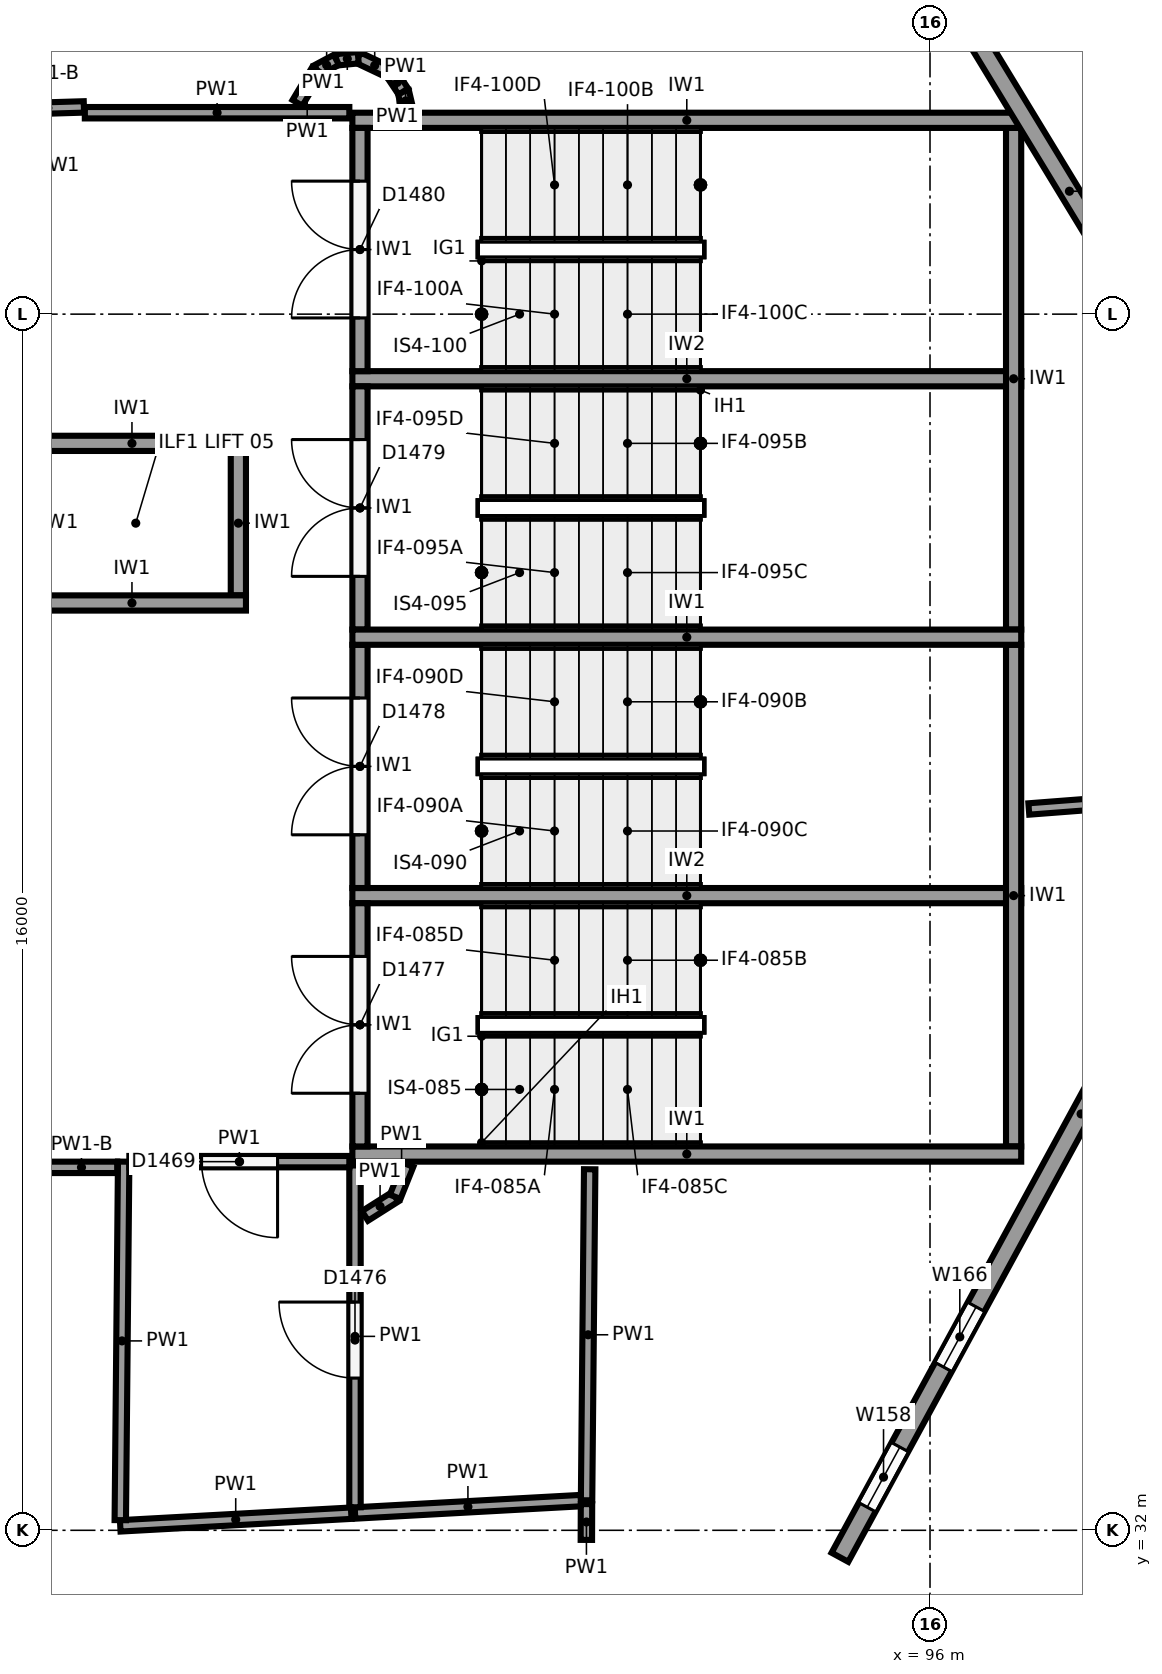
"""IFC4 building model, lengths in metres.
Left out: names, types, materials, properties, quantities, classifications, styles, units other than length and angle.
Written with IfcOpenShell. Run it as: python <this file> out.ifc"""

import sys

from ifc_helpers import new_model, si_unit, direction, frame, frame_2d, origin, origin_2d, place, context, subcontext, project, spatial, rectangle, circle, extrude, element, fill, save


model = new_model("IFC4")
c1 = context("Model", 3, precision=1e-05, world=origin(), true_north=direction((0.0, 1.0)))
c2 = subcontext(c1, "Body", "Model", "MODEL_VIEW")
j1 = project(units=[si_unit("LENGTHUNIT", "METRE"), si_unit("PLANEANGLEUNIT", "RADIAN")], contexts=[c1])
p1 = place(None, origin())
s1 = spatial("IfcSite", under=j1, at=p1, CompositionType="ELEMENT")
p2 = place(p1, origin())
s2 = spatial("IfcBuilding", under=s1, at=p2, CompositionType="ELEMENT")
p3 = place(p2, frame((0.0, 0.0, 18.0)))
s3 = spatial("IfcBuildingStorey", under=s2, at=p3, CompositionType="ELEMENT", Elevation=18.0)
p4 = place(p3, frame((84.925, 30.682, 0.0), z_axis=(0.0, 0.0, 1.0), x_axis=(1.0, 0.0, 0.0)))
e1 = element("IfcColumn", 1, at=p4, inside=s3, PredefinedType="COLUMN", context=c2, shape_type="SweptSolid", body=[
    extrude(circle(Radius=0.5, at=origin_2d()), origin(), (0.0, 0.0, 1.0), 6.0),
])
p5 = place(p3, frame((94.6, 31.25, 0.0), z_axis=(0.0, 0.0, 1.0), x_axis=(1.0, 0.0, 0.0)))
e2 = element("IfcColumn", 2, at=p5, inside=s3, PredefinedType="COLUMN", context=c2, shape_type="SweptSolid", body=[
    extrude(circle(Radius=0.45, at=origin_2d()), origin(), (0.0, 0.0, 1.0), 6.0),
])
p6 = place(p3, frame((84.884, 42.562, 0.0), z_axis=(0.0, 0.0, 1.0), x_axis=(1.0, 0.0, 0.0)))
e3 = element("IfcColumn", 3, at=p6, inside=s3, PredefinedType="COLUMN", context=c2, shape_type="SweptSolid", body=[
    extrude(circle(Radius=0.6, at=origin_2d()), origin(), (0.0, 0.0, 1.0), 6.0),
])
p7 = place(p3, frame((101.161, 43.311, 0.0), z_axis=(0.0, 0.0, 1.0), x_axis=(-0.477867771117, -0.878431780691, 0.0)))
e4 = element("IfcWall", 4, at=p7, inside=s3, PredefinedType="SOLIDWALL", context=c2, shape_type="SweptSolid", body=[
    extrude(rectangle(XDim=13.28, YDim=0.25, at=frame_2d((6.64, 0.0))), origin(), (0.0, 0.0, 1.0), 4.3),
])
p8 = place(p7, frame((11.63, 0.0, 1.0)))
e5 = element("IfcOpeningElement", 5, at=p8, cuts=e4, PredefinedType="OPENING", context=c2, shape_type="SweptSolid", body=[
    extrude(rectangle(XDim=0.9, YDim=3.25, at=frame_2d((0.45, 1.625))), frame((0.0, 0.135, 0.0), z_axis=(0.0, -1.0, 0.0), x_axis=(1.0, 0.0, 0.0)), (0.0, 0.0, 1.0), 0.27),
])
p9 = place(p7, frame((9.53, 0.0, 1.0)))
e6 = element("IfcOpeningElement", 6, at=p9, cuts=e4, PredefinedType="OPENING", context=c2, shape_type="SweptSolid", body=[
    extrude(rectangle(XDim=0.9, YDim=3.25, at=frame_2d((0.45, 1.625))), frame((0.0, 0.135, 0.0), z_axis=(0.0, -1.0, 0.0), x_axis=(1.0, 0.0, 0.0)), (0.0, 0.0, 1.0), 0.27),
])
p10 = place(p7, frame((1.13, 0.0, 1.0)))
e7 = element("IfcOpeningElement", 7, at=p10, cuts=e4, PredefinedType="OPENING", context=c2, shape_type="SweptSolid", body=[
    extrude(rectangle(XDim=0.9, YDim=3.25, at=frame_2d((0.45, 1.625))), frame((0.0, 0.135, 0.0), z_axis=(0.0, -1.0, 0.0), x_axis=(1.0, 0.0, 0.0)), (0.0, 0.0, 1.0), 0.27),
])
p11 = place(p3, frame((94.528, 55.057, 0.0), z_axis=(0.0, 0.0, 1.0), x_axis=(0.519362860044, -0.854553813172, 0.0)))
e8 = element("IfcWall", 8, at=p11, inside=s3, PredefinedType="SOLIDWALL", context=c2, shape_type="SweptSolid", body=[
    extrude(rectangle(XDim=12.732, YDim=0.25, at=frame_2d((6.366, 0.0))), origin(), (0.0, 0.0, 1.0), 4.3),
])
p12 = place(p11, frame((0.75, 0.0, 1.0)))
e9 = element("IfcOpeningElement", 9, at=p12, cuts=e8, PredefinedType="OPENING", context=c2, shape_type="SweptSolid", body=[
    extrude(rectangle(XDim=0.9, YDim=3.25, at=frame_2d((0.45, 1.625))), frame((0.0, 0.135, 0.0), z_axis=(0.0, -1.0, 0.0), x_axis=(1.0, 0.0, 0.0)), (0.0, 0.0, 1.0), 0.27),
])
p13 = place(p11, frame((2.851, 0.0, 1.0)))
e10 = element("IfcOpeningElement", 10, at=p13, cuts=e8, PredefinedType="OPENING", context=c2, shape_type="SweptSolid", body=[
    extrude(rectangle(XDim=0.9, YDim=3.25, at=frame_2d((0.45, 1.625))), frame((0.0, 0.135, 0.0), z_axis=(0.0, -1.0, 0.0), x_axis=(1.0, 0.0, 0.0)), (0.0, 0.0, 1.0), 0.27),
])
p14 = place(p11, frame((11.25, 0.0, 1.0)))
e11 = element("IfcOpeningElement", 11, at=p14, cuts=e8, PredefinedType="OPENING", context=c2, shape_type="SweptSolid", body=[
    extrude(rectangle(XDim=0.9, YDim=3.25, at=frame_2d((0.45, 1.625))), frame((0.0, 0.135, 0.0), z_axis=(0.0, -1.0, 0.0), x_axis=(1.0, 0.0, 0.0)), (0.0, 0.0, 1.0), 0.27),
])
for number, where, z_axis, x_axis in (
    (12, (97.2, 36.95, 0.0), (0.0, 0.0, 1.0), (-1.0, 0.0, 0.0)),
    (13, (97.2, 43.75, 0.0), (0.0, 0.0, 1.0), (-1.0, 0.0, 0.0)),
    (14, (97.2, 50.55, 0.0), (0.0, 0.0, 1.0), (-1.0, 0.0, 0.0)),
):
    element("IfcWall", number, at=place(p3, frame(where, z_axis=z_axis, x_axis=x_axis)), inside=s3, PredefinedType="SHEAR", context=c2, shape_type="SweptSolid", body=[
        extrude(rectangle(XDim=8.8, YDim=0.2, at=frame_2d((4.4, 0.0))), origin(), (0.0, 0.0, 1.0), 5.6),
    ])
for number, where, z_axis, x_axis in (
    (15, (97.1, 37.05, 0.0), (0.0, 0.0, 1.0), (0.0, 1.0, 0.0)),
    (16, (97.1, 43.85, 0.0), (0.0, 0.0, 1.0), (0.0, 1.0, 0.0)),
):
    element("IfcWall", number, at=place(p3, frame(where, z_axis=z_axis, x_axis=x_axis)), inside=s3, PredefinedType="SHEAR", context=c2, shape_type="SweptSolid", body=[
        extrude(rectangle(XDim=6.6, YDim=0.2, at=frame_2d((3.3, 0.0))), origin(), (0.0, 0.0, 1.0), 5.6),
    ])
for number, where, z_axis, x_axis in (
    (17, (97.2, 40.35, 0.0), (0.0, 0.0, 1.0), (-1.0, 0.0, 0.0)),
    (18, (97.2, 47.15, 0.0), (0.0, 0.0, 1.0), (-1.0, 0.0, 0.0)),
):
    element("IfcWall", number, at=place(p3, frame(where, z_axis=z_axis, x_axis=x_axis)), inside=s3, PredefinedType="SHEAR", context=c2, shape_type="SweptSolid", body=[
        extrude(rectangle(XDim=8.8, YDim=0.2, at=frame_2d((4.4, 0.0))), origin(), (0.0, 0.0, 1.0), 5.6),
    ])
p15 = place(p3, frame((88.5, 37.05, 0.0), z_axis=(0.0, 0.0, 1.0), x_axis=(0.0, 1.0, 0.0)))
e19 = element("IfcWall", 19, at=p15, inside=s3, PredefinedType="SHEAR", context=c2, shape_type="SweptSolid", body=[
    extrude(rectangle(XDim=3.2, YDim=0.2, at=frame_2d((1.6, 0.0))), origin(), (0.0, 0.0, 1.0), 5.6),
])
p16 = place(p15, frame((0.7, 0.0, 0.0)))
e20 = element("IfcOpeningElement", 20, at=p16, cuts=e19, PredefinedType="OPENING", context=c2, shape_type="SweptSolid", body=[
    extrude(rectangle(XDim=1.8, YDim=2.1, at=frame_2d((0.9, 1.05))), frame((0.0, 0.11, 0.0), z_axis=(0.0, -1.0, 0.0), x_axis=(1.0, 0.0, 0.0)), (0.0, 0.0, 1.0), 0.22),
])
p17 = place(p3, frame((88.5, 40.45, 0.0), z_axis=(0.0, 0.0, 1.0), x_axis=(0.0, 1.0, 0.0)))
e21 = element("IfcWall", 21, at=p17, inside=s3, PredefinedType="SHEAR", context=c2, shape_type="SweptSolid", body=[
    extrude(rectangle(XDim=3.2, YDim=0.2, at=frame_2d((1.6, 0.0))), origin(), (0.0, 0.0, 1.0), 5.6),
])
p18 = place(p17, frame((0.7, 0.0, 0.0)))
e22 = element("IfcOpeningElement", 22, at=p18, cuts=e21, PredefinedType="OPENING", context=c2, shape_type="SweptSolid", body=[
    extrude(rectangle(XDim=1.8, YDim=2.1, at=frame_2d((0.9, 1.05))), frame((0.0, 0.11, 0.0), z_axis=(0.0, -1.0, 0.0), x_axis=(1.0, 0.0, 0.0)), (0.0, 0.0, 1.0), 0.22),
])
p19 = place(p3, frame((88.5, 43.85, 0.0), z_axis=(0.0, 0.0, 1.0), x_axis=(0.0, 1.0, 0.0)))
e23 = element("IfcWall", 23, at=p19, inside=s3, PredefinedType="SHEAR", context=c2, shape_type="SweptSolid", body=[
    extrude(rectangle(XDim=3.2, YDim=0.2, at=frame_2d((1.6, 0.0))), origin(), (0.0, 0.0, 1.0), 5.6),
])
p20 = place(p19, frame((0.7, 0.0, 0.0)))
e24 = element("IfcOpeningElement", 24, at=p20, cuts=e23, PredefinedType="OPENING", context=c2, shape_type="SweptSolid", body=[
    extrude(rectangle(XDim=1.8, YDim=2.1, at=frame_2d((0.9, 1.05))), frame((0.0, 0.11, 0.0), z_axis=(0.0, -1.0, 0.0), x_axis=(1.0, 0.0, 0.0)), (0.0, 0.0, 1.0), 0.22),
])
p21 = place(p3, frame((88.5, 47.25, 0.0), z_axis=(0.0, 0.0, 1.0), x_axis=(0.0, 1.0, 0.0)))
e25 = element("IfcWall", 25, at=p21, inside=s3, PredefinedType="SHEAR", context=c2, shape_type="SweptSolid", body=[
    extrude(rectangle(XDim=3.2, YDim=0.2, at=frame_2d((1.6, 0.0))), origin(), (0.0, 0.0, 1.0), 5.6),
])
p22 = place(p21, frame((0.7, 0.0, 0.0)))
e26 = element("IfcOpeningElement", 26, at=p22, cuts=e25, PredefinedType="OPENING", context=c2, shape_type="SweptSolid", body=[
    extrude(rectangle(XDim=1.8, YDim=2.1, at=frame_2d((0.9, 1.05))), frame((0.0, 0.11, 0.0), z_axis=(0.0, -1.0, 0.0), x_axis=(1.0, 0.0, 0.0)), (0.0, 0.0, 1.0), 0.22),
])
for number, where, z_axis, x_axis in (
    (27, (87.0, 44.2, 0.0), (0.0, 0.0, 1.0), (-1.0, 0.0, 0.0)),
    (28, (87.0, 46.3, 0.0), (0.0, 0.0, 1.0), (-1.0, 0.0, 0.0)),
):
    element("IfcWall", number, at=place(p3, frame(where, z_axis=z_axis, x_axis=x_axis)), inside=s3, PredefinedType="SHEAR", context=c2, shape_type="SweptSolid", body=[
        extrude(rectangle(XDim=3.0, YDim=0.2, at=frame_2d((1.5, 0.0))), origin(), (0.0, 0.0, 1.0), 5.6),
    ])
p23 = place(p3, frame((86.9, 44.3, 0.0), z_axis=(0.0, 0.0, 1.0), x_axis=(0.0, 1.0, 0.0)))
e29 = element("IfcWall", 29, at=p23, inside=s3, PredefinedType="SHEAR", context=c2, shape_type="SweptSolid", body=[
    extrude(rectangle(XDim=1.9, YDim=0.2, at=frame_2d((0.95, 0.0))), origin(), (0.0, 0.0, 1.0), 5.6),
])
p24 = place(p3, frame((91.522, 36.75, 0.0), z_axis=(0.0, 0.0, 1.0), x_axis=(-0.009417678532, -0.999955652682, 0.0)))
e30 = element("IfcWall", 30, at=p24, inside=s3, PredefinedType="PARTITIONING", context=c2, shape_type="SweptSolid", body=[
    extrude(rectangle(XDim=4.355, YDim=0.15, at=frame_2d((2.178, 0.0))), origin(), (0.0, 0.0, 1.0), 5.6),
])
p25 = place(p3, frame((91.406, 32.391, 0.0), z_axis=(0.0, 0.0, 1.0), x_axis=(-0.998501968138, -0.054715807817, 0.0)))
e31 = element("IfcWall", 31, at=p25, inside=s3, PredefinedType="PARTITIONING", context=c2, shape_type="SweptSolid", body=[
    extrude(rectangle(XDim=2.976, YDim=0.15, at=frame_2d((1.488, 0.0))), origin(), (0.0, 0.0, 1.0), 5.6),
])
p26 = place(p3, frame((88.435, 32.303, 0.0), z_axis=(0.0, 0.0, 1.0), x_axis=(0.0, 1.0, 0.0)))
e32 = element("IfcWall", 32, at=p26, inside=s3, PredefinedType="PARTITIONING", context=c2, shape_type="SweptSolid", body=[
    extrude(rectangle(XDim=4.497, YDim=0.15, at=frame_2d((2.249, 0.0))), origin(), (0.0, 0.0, 1.0), 5.6),
])
p27 = place(p26, frame((1.7, 0.0, 0.0)))
e33 = element("IfcOpeningElement", 33, at=p27, cuts=e32, PredefinedType="OPENING", context=c2, shape_type="SweptSolid", body=[
    extrude(rectangle(XDim=1.0, YDim=2.1, at=frame_2d((0.5, 1.05))), frame((0.0, 0.085, 0.0), z_axis=(0.0, -1.0, 0.0), x_axis=(1.0, 0.0, 0.0)), (0.0, 0.0, 1.0), 0.17),
])
p28 = place(p3, frame((88.385, 32.225, 0.0), z_axis=(0.0, 0.0, 1.0), x_axis=(-0.99850227238, -0.054710255464, 0.0)))
e34 = element("IfcWall", 34, at=p28, inside=s3, PredefinedType="PARTITIONING", context=c2, shape_type="SweptSolid", body=[
    extrude(rectangle(XDim=3.043, YDim=0.15, at=frame_2d((1.522, 0.0))), origin(), (0.0, 0.0, 1.0), 5.6),
])
p29 = place(p3, frame((85.346, 32.134, 0.0), z_axis=(0.0, 0.0, 1.0), x_axis=(0.009420359449, 0.999955627429, 0.0)))
e35 = element("IfcWall", 35, at=p29, inside=s3, PredefinedType="PARTITIONING", context=c2, shape_type="SweptSolid", body=[
    extrude(rectangle(XDim=4.717, YDim=0.15, at=frame_2d((2.358, 0.0))), origin(), (0.0, 0.0, 1.0), 5.6),
])
p30 = place(p3, frame((85.466, 36.85, 0.0), z_axis=(0.0, 0.0, 1.0), x_axis=(1.0, 0.0, 0.0)))
e36 = element("IfcWall", 36, at=p30, inside=s3, PredefinedType="PARTITIONING", context=c2, shape_type="SweptSolid", body=[
    extrude(rectangle(XDim=2.894, YDim=0.15, at=frame_2d((1.447, 0.0))), origin(), (0.0, 0.0, 1.0), 5.6),
])
p31 = place(p30, frame((0.95, 0.0, 0.0)))
e37 = element("IfcOpeningElement", 37, at=p31, cuts=e36, PredefinedType="OPENING", context=c2, shape_type="SweptSolid", body=[
    extrude(rectangle(XDim=1.0, YDim=2.1, at=frame_2d((0.5, 1.05))), frame((0.0, 0.085, 0.0), z_axis=(0.0, -1.0, 0.0), x_axis=(1.0, 0.0, 0.0)), (0.0, 0.0, 1.0), 0.17),
])
p32 = place(p3, frame((91.48, 32.345, 0.0), z_axis=(0.0, 0.0, 1.0), x_axis=(-0.004147190878, -0.999991400367, 0.0)))
e38 = element("IfcWall", 38, at=p32, inside=s3, PredefinedType="PARTITIONING", context=c2, shape_type="SweptSolid", body=[
    extrude(rectangle(XDim=0.471, YDim=0.15, at=frame_2d((0.235, 0.0))), origin(), (0.0, 0.0, 1.0), 5.6),
])
p33 = place(p3, frame((97.3, 41.49, 0.0), z_axis=(0.0, 0.0, 1.0), x_axis=(0.99706720675, 0.076530942913, 0.0)))
e39 = element("IfcWall", 39, at=p33, inside=s3, PredefinedType="PARTITIONING", context=c2, shape_type="SweptSolid", body=[
    extrude(rectangle(XDim=2.255, YDim=0.15, at=frame_2d((1.128, 0.0))), origin(), (0.0, 0.0, 1.0), 5.6),
])
p34 = place(p3, frame((88.36, 50.65, 0.0), z_axis=(0.0, 0.0, 1.0), x_axis=(-1.0, 0.0, 0.0)))
e40 = element("IfcWall", 40, at=p34, inside=s3, PredefinedType="PARTITIONING", context=c2, shape_type="SweptSolid", body=[
    extrude(rectangle(XDim=3.48, YDim=0.15, at=frame_2d((1.74, 0.0))), origin(), (0.0, 0.0, 1.0), 5.6),
])
p35 = place(p3, frame((84.366, 36.775, 0.0), z_axis=(0.0, 0.0, 1.0), x_axis=(1.0, 0.0, 0.0)))
e41 = element("IfcWall", 41, at=p35, inside=s3, PredefinedType="PARTITIONING", context=c2, shape_type="SweptSolid", body=[
    extrude(rectangle(XDim=0.94, YDim=0.15, at=frame_2d((0.47, 0.0))), origin(), (0.0, 0.0, 1.0), 4.5),
])
p36 = place(p3, frame((88.566, 36.136, 0.0), z_axis=(0.0, 0.0, 1.0), x_axis=(0.845155463404, 0.534520572737, 0.0)))
e42 = element("IfcWall", 42, at=p36, inside=s3, PredefinedType="PARTITIONING", context=c2, shape_type="SweptSolid", body=[
    extrude(rectangle(XDim=0.47, YDim=0.15, at=frame_2d((0.235, 0.0))), origin(), (0.0, 0.0, 1.0), 5.6),
])
p37 = place(p3, frame((88.963, 36.387, 0.0), z_axis=(0.0, 0.0, 1.0), x_axis=(0.371761148228, 0.928328416385, 0.0)))
e43 = element("IfcWall", 43, at=p37, inside=s3, PredefinedType="PARTITIONING", context=c2, shape_type="SweptSolid", body=[
    extrude(rectangle(XDim=0.454, YDim=0.15, at=frame_2d((0.227, 0.0))), origin(), (0.0, 0.0, 1.0), 5.6),
])
p38 = place(p3, frame((89.13, 50.678, 0.0), z_axis=(0.0, 0.0, 1.0), x_axis=(-0.231150896285, 0.972917911823, 0.0)))
e44 = element("IfcWall", 44, at=p38, inside=s3, PredefinedType="PARTITIONING", context=c2, shape_type="SweptSolid", body=[
    extrude(rectangle(XDim=0.258, YDim=0.15, at=frame_2d((0.129, 0.0))), origin(), (0.0, 0.0, 1.0), 5.6),
])
p39 = place(p3, frame((89.07, 50.929, 0.0), z_axis=(0.0, 0.0, 1.0), x_axis=(-0.555678694372, 0.831397130511, 0.0)))
e45 = element("IfcWall", 45, at=p39, inside=s3, PredefinedType="PARTITIONING", context=c2, shape_type="SweptSolid", body=[
    extrude(rectangle(XDim=0.288, YDim=0.15, at=frame_2d((0.144, 0.0))), origin(), (0.0, 0.0, 1.0), 5.6),
])
p40 = place(p3, frame((88.91, 51.168, 0.0), z_axis=(0.0, 0.0, 1.0), x_axis=(-0.903893315025, 0.427757963167, 0.0)))
e46 = element("IfcWall", 46, at=p40, inside=s3, PredefinedType="PARTITIONING", context=c2, shape_type="SweptSolid", body=[
    extrude(rectangle(XDim=0.479, YDim=0.15, at=frame_2d((0.24, 0.0))), origin(), (0.0, 0.0, 1.0), 5.6),
])
for number, where, z_axis, x_axis in (
    (47, (88.477, 51.374, 0.0), (0.0, 0.0, 1.0), (-0.995, -0.098, 0.0)),
    (48, (88.189, 51.345, 0.0), (0.0, 0.0, 1.0), (-0.882, -0.472, 0.0)),
):
    element("IfcWall", number, at=place(p3, frame(where, z_axis=z_axis, x_axis=x_axis)), inside=s3, PredefinedType="PARTITIONING", context=c2, shape_type="SweptSolid", body=[
        extrude(rectangle(XDim=0.289, YDim=0.15, at=frame_2d((0.145, 0.0))), origin(), (0.0, 0.0, 1.0), 5.6),
    ])
p41 = place(p3, frame((87.934, 51.209, 0.0), z_axis=(0.0, 0.0, 1.0), x_axis=(-0.513060623194, -0.858352373404, 0.0)))
e49 = element("IfcWall", 49, at=p41, inside=s3, PredefinedType="PARTITIONING", context=c2, shape_type="SweptSolid", body=[
    extrude(rectangle(XDim=0.5, YDim=0.15, at=frame_2d((0.25, 0.0))), origin(), (0.0, 0.0, 1.0), 5.6),
])
p42 = place(p3, frame((84.868, 50.726, 0.0), z_axis=(0.0, 0.0, 1.0), x_axis=(-0.999545658695, -0.030140938677, 0.0)))
e50 = element("IfcWall", 50, at=p42, inside=s3, PredefinedType="PARTITIONING", context=c2, shape_type="SweptSolid", body=[
    extrude(rectangle(XDim=0.948, YDim=0.15, at=frame_2d((0.474, 0.0))), origin(), (0.0, 0.0, 1.0), 4.5),
])
p43 = place(p8, origin())
e51 = element("IfcWindow", 51, at=p43, inside=s3, PartitioningType="SINGLE_PANEL", PredefinedType="WINDOW", context=c2, shape_type="SweptSolid", body=[
    extrude(rectangle(XDim=0.9, YDim=3.25, at=frame_2d((0.45, 1.625))), frame((0.0, 0.03, 0.0), z_axis=(0.0, -1.0, 0.0), x_axis=(1.0, 0.0, 0.0)), (0.0, 0.0, 1.0), 0.06),
])
fill(e5, e51)
p44 = place(p9, origin())
e52 = element("IfcWindow", 52, at=p44, inside=s3, PartitioningType="SINGLE_PANEL", PredefinedType="WINDOW", context=c2, shape_type="SweptSolid", body=[
    extrude(rectangle(XDim=0.9, YDim=3.25, at=frame_2d((0.45, 1.625))), frame((0.0, 0.03, 0.0), z_axis=(0.0, -1.0, 0.0), x_axis=(1.0, 0.0, 0.0)), (0.0, 0.0, 1.0), 0.06),
])
fill(e6, e52)
p45 = place(p16, origin())
e53 = element("IfcDoor", 53, at=p45, inside=s3, OperationType="DOUBLE_DOOR_SINGLE_SWING", PredefinedType="DOOR", context=c2, shape_type="SweptSolid", body=[
    extrude(rectangle(XDim=1.8, YDim=2.1, at=frame_2d((0.9, 1.05))), frame((0.0, 0.025, 0.0), z_axis=(0.0, -1.0, 0.0), x_axis=(1.0, 0.0, 0.0)), (0.0, 0.0, 1.0), 0.05),
])
fill(e20, e53)
p46 = place(p18, origin())
e54 = element("IfcDoor", 54, at=p46, inside=s3, OperationType="DOUBLE_DOOR_SINGLE_SWING", PredefinedType="DOOR", context=c2, shape_type="SweptSolid", body=[
    extrude(rectangle(XDim=1.8, YDim=2.1, at=frame_2d((0.9, 1.05))), frame((0.0, 0.025, 0.0), z_axis=(0.0, -1.0, 0.0), x_axis=(1.0, 0.0, 0.0)), (0.0, 0.0, 1.0), 0.05),
])
fill(e22, e54)
p47 = place(p20, origin())
e55 = element("IfcDoor", 55, at=p47, inside=s3, OperationType="DOUBLE_DOOR_SINGLE_SWING", PredefinedType="DOOR", context=c2, shape_type="SweptSolid", body=[
    extrude(rectangle(XDim=1.8, YDim=2.1, at=frame_2d((0.9, 1.05))), frame((0.0, 0.025, 0.0), z_axis=(0.0, -1.0, 0.0), x_axis=(1.0, 0.0, 0.0)), (0.0, 0.0, 1.0), 0.05),
])
fill(e24, e55)
p48 = place(p22, origin())
e56 = element("IfcDoor", 56, at=p48, inside=s3, OperationType="DOUBLE_DOOR_SINGLE_SWING", PredefinedType="DOOR", context=c2, shape_type="SweptSolid", body=[
    extrude(rectangle(XDim=1.8, YDim=2.1, at=frame_2d((0.9, 1.05))), frame((0.0, 0.025, 0.0), z_axis=(0.0, -1.0, 0.0), x_axis=(1.0, 0.0, 0.0)), (0.0, 0.0, 1.0), 0.05),
])
fill(e26, e56)
p49 = place(p27, origin())
e57 = element("IfcDoor", 57, at=p49, inside=s3, OperationType="SINGLE_SWING_RIGHT", PredefinedType="DOOR", context=c2, shape_type="SweptSolid", body=[
    extrude(rectangle(XDim=1.0, YDim=2.1, at=frame_2d((0.5, 1.05))), frame((0.0, 0.025, 0.0), z_axis=(0.0, -1.0, 0.0), x_axis=(1.0, 0.0, 0.0)), (0.0, 0.0, 1.0), 0.05),
])
fill(e33, e57)
p50 = place(p31, frame((1.0, 0.0, 0.0), z_axis=(0.0, 0.0, 1.0), x_axis=(-1.0, 0.0, 0.0)))
e58 = element("IfcDoor", 58, at=p50, inside=s3, OperationType="SINGLE_SWING_LEFT", PredefinedType="DOOR", context=c2, shape_type="SweptSolid", body=[
    extrude(rectangle(XDim=1.0, YDim=2.1, at=frame_2d((0.5, 1.05))), frame((0.0, 0.025, 0.0), z_axis=(0.0, -1.0, 0.0), x_axis=(1.0, 0.0, 0.0)), (0.0, 0.0, 1.0), 0.05),
])
fill(e37, e58)
save(model, sys.argv[1])
